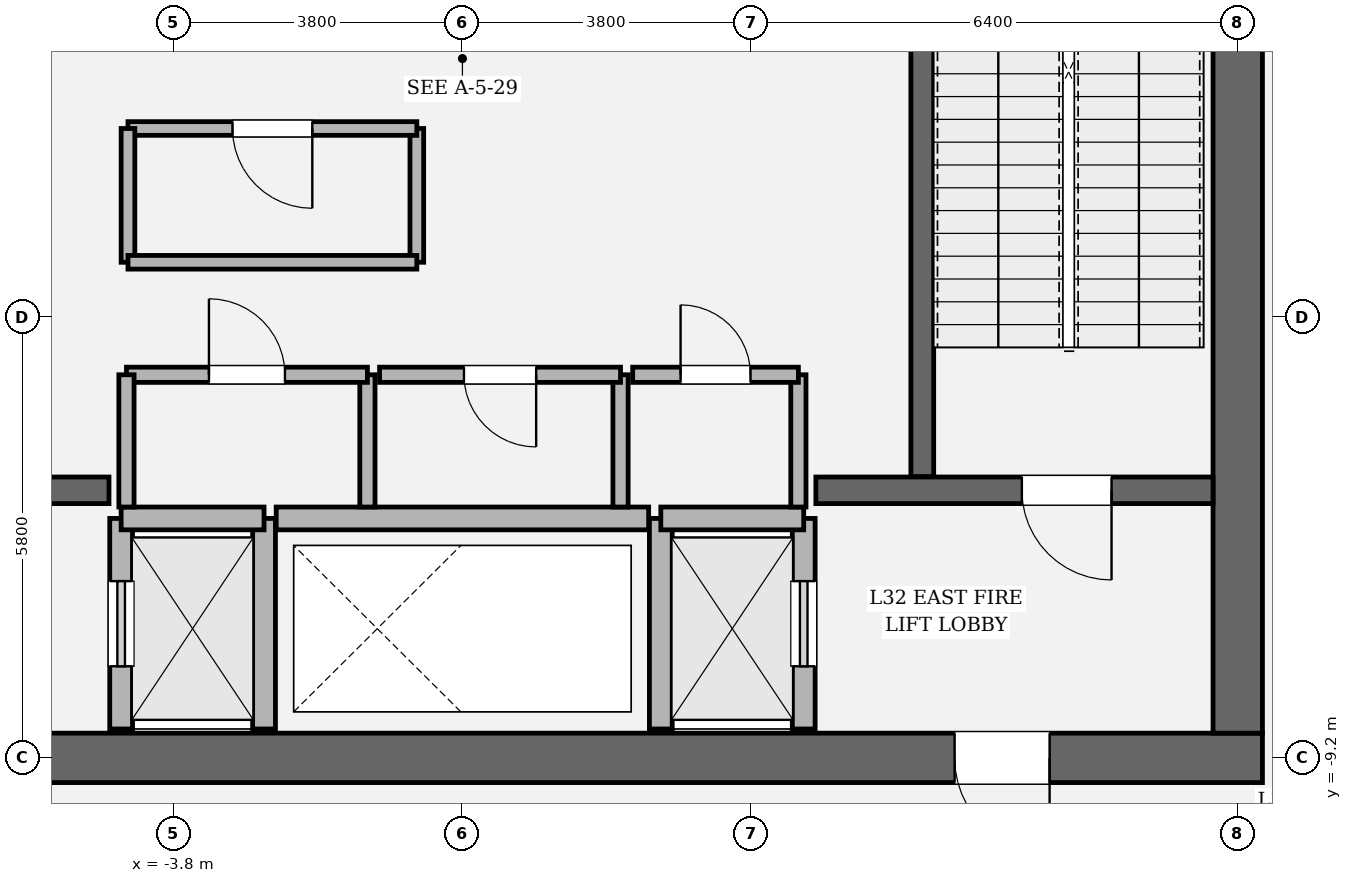
"""IFC4 building model, lengths in metres.
Left out: names, types, materials, properties, quantities, classifications, styles, units other than length and angle.
Written with IfcOpenShell. Run it as: python <this file> out.ifc"""

import sys

from ifc_helpers import new_model, si_unit, direction, frame, frame_2d, origin, place, context, subcontext, project, spatial, rectangle, extrude, element, fill, save


model = new_model("IFC4")
c1 = context("Model", 3, precision=1e-05, world=origin(), true_north=direction((0.0, 1.0)))
c2 = subcontext(c1, "Body", "Model", "MODEL_VIEW")
j1 = project(units=[si_unit("LENGTHUNIT", "METRE"), si_unit("PLANEANGLEUNIT", "RADIAN")], contexts=[c1])
p1 = place(None, origin())
s1 = spatial("IfcSite", under=j1, at=p1, CompositionType="ELEMENT")
p2 = place(p1, origin())
s2 = spatial("IfcBuilding", under=s1, at=p2, CompositionType="ELEMENT")
p3 = place(p2, frame((0.0, 0.0, 139.8)))
s3 = spatial("IfcBuildingStorey", under=s2, at=p3, CompositionType="ELEMENT", Elevation=139.8)
p4 = place(p3, frame((10.525, -9.2, 0.0), z_axis=(0.0, 0.0, 1.0), x_axis=(-1.0, 0.0, 0.0)))
e1 = element("IfcWall", 1, at=p4, inside=s3, PredefinedType="SHEAR", context=c2, shape_type="SweptSolid", body=[
    extrude(rectangle(XDim=21.05, YDim=0.65, at=frame_2d((10.525, 0.0))), origin(), (0.0, 0.0, 1.0), 4.05),
])
p5 = place(p4, frame((2.8, 0.0, 0.0)))
e2 = element("IfcOpeningElement", 2, at=p5, cuts=e1, PredefinedType="OPENING", context=c2, shape_type="SweptSolid", body=[
    extrude(rectangle(XDim=1.25, YDim=2.25, at=frame_2d((0.625, 1.125))), frame((0.0, 0.335, 0.0), z_axis=(0.0, -1.0, 0.0), x_axis=(1.0, 0.0, 0.0)), (0.0, 0.0, 1.0), 0.67),
])
p6 = place(p4, frame((17.0, 0.0, 0.0)))
e3 = element("IfcOpeningElement", 3, at=p6, cuts=e1, PredefinedType="OPENING", context=c2, shape_type="SweptSolid", body=[
    extrude(rectangle(XDim=1.25, YDim=2.25, at=frame_2d((0.625, 1.125))), frame((0.0, 0.335, 0.0), z_axis=(0.0, -1.0, 0.0), x_axis=(1.0, 0.0, 0.0)), (0.0, 0.0, 1.0), 0.67),
])
p7 = place(p3, frame((10.2, 8.875, 0.0), z_axis=(0.0, 0.0, 1.0), x_axis=(0.0, -1.0, 0.0)))
e4 = element("IfcWall", 4, at=p7, inside=s3, PredefinedType="SHEAR", context=c2, shape_type="SweptSolid", body=[
    extrude(rectangle(XDim=17.75, YDim=0.65, at=frame_2d((8.875, 0.0))), origin(), (0.0, 0.0, 1.0), 4.05),
])
p8 = place(p7, frame((3.905, 0.0, 0.0)))
e5 = element("IfcOpeningElement", 5, at=p8, cuts=e4, PredefinedType="OPENING", context=c2, shape_type="SweptSolid", body=[
    extrude(rectangle(XDim=1.18, YDim=2.2, at=frame_2d((0.59, 1.1))), frame((0.0, 0.335, 0.0), z_axis=(0.0, -1.0, 0.0), x_axis=(1.0, 0.0, 0.0)), (0.0, 0.0, 1.0), 0.67),
])
p9 = place(p3, frame((6.05, 3.45, 0.0), z_axis=(0.0, 0.0, 1.0), x_axis=(0.0, -1.0, 0.0)))
e6 = element("IfcWall", 6, at=p9, inside=s3, PredefinedType="SOLIDWALL", context=c2, shape_type="SweptSolid", body=[
    extrude(rectangle(XDim=8.95, YDim=0.3, at=frame_2d((4.475, 0.0))), origin(), (0.0, 0.0, 1.0), 4.05),
])
p10 = place(p3, frame((-9.875, -5.68, 0.0), z_axis=(0.0, 0.0, 1.0), x_axis=(1.0, 0.0, 0.0)))
e7 = element("IfcWall", 7, at=p10, inside=s3, PredefinedType="SOLIDWALL", context=c2, shape_type="SweptSolid", body=[
    extrude(rectangle(XDim=5.225, YDim=0.35, at=frame_2d((2.613, 0.0))), origin(), (0.0, 0.0, 1.0), 4.05),
])
p11 = place(p10, frame((1.335, 0.0, 0.0)))
e8 = element("IfcOpeningElement", 8, at=p11, cuts=e7, PredefinedType="OPENING", context=c2, shape_type="SweptSolid", body=[
    extrude(rectangle(XDim=1.18, YDim=2.2, at=frame_2d((0.59, 1.1))), frame((0.0, 0.185, 0.0), z_axis=(0.0, -1.0, 0.0), x_axis=(1.0, 0.0, 0.0)), (0.0, 0.0, 1.0), 0.37),
])
p12 = place(p3, frame((4.65, -5.68, 0.0), z_axis=(0.0, 0.0, 1.0), x_axis=(1.0, 0.0, 0.0)))
e9 = element("IfcWall", 9, at=p12, inside=s3, PredefinedType="SOLIDWALL", context=c2, shape_type="SweptSolid", body=[
    extrude(rectangle(XDim=5.225, YDim=0.35, at=frame_2d((2.613, 0.0))), origin(), (0.0, 0.0, 1.0), 4.05),
])
p13 = place(p12, frame((2.71, 0.0, 0.0)))
e10 = element("IfcOpeningElement", 10, at=p13, cuts=e9, PredefinedType="OPENING", context=c2, shape_type="SweptSolid", body=[
    extrude(rectangle(XDim=1.18, YDim=2.2, at=frame_2d((0.59, 1.1))), frame((0.0, 0.185, 0.0), z_axis=(0.0, -1.0, 0.0), x_axis=(1.0, 0.0, 0.0)), (0.0, 0.0, 1.0), 0.37),
])
p14 = place(p3, frame((-4.49, -8.82, 0.0), z_axis=(0.0, 0.0, 1.0), x_axis=(0.0, 1.0, 0.0)))
e11 = element("IfcWall", 11, at=p14, inside=s3, PredefinedType="SOLIDWALL", context=c2, shape_type="SweptSolid", body=[
    extrude(rectangle(XDim=2.77, YDim=0.3, at=frame_2d((1.385, 0.0))), origin(), (0.0, 0.0, 1.0), 3.83),
])
p15 = place(p14, frame((0.825, 0.0, 0.0)))
e12 = element("IfcOpeningElement", 12, at=p15, cuts=e11, PredefinedType="OPENING", context=c2, shape_type="SweptSolid", body=[
    extrude(rectangle(XDim=1.12, YDim=2.25, at=frame_2d((0.56, 1.125))), frame((0.0, 0.16, 0.0), z_axis=(0.0, -1.0, 0.0), x_axis=(1.0, 0.0, 0.0)), (0.0, 0.0, 1.0), 0.32),
])
p16 = place(p3, frame((-2.61, -8.82, 0.0), z_axis=(0.0, 0.0, 1.0), x_axis=(0.0, 1.0, 0.0)))
e13 = element("IfcWall", 13, at=p16, inside=s3, PredefinedType="SOLIDWALL", context=c2, shape_type="SweptSolid", body=[
    extrude(rectangle(XDim=2.77, YDim=0.3, at=frame_2d((1.385, 0.0))), origin(), (0.0, 0.0, 1.0), 3.83),
])
p17 = place(p3, frame((-4.49, -6.05, 0.0), z_axis=(0.0, 0.0, 1.0), x_axis=(1.0, 0.0, 0.0)))
e14 = element("IfcWall", 14, at=p17, inside=s3, PredefinedType="SOLIDWALL", context=c2, shape_type="SweptSolid", body=[
    extrude(rectangle(XDim=1.88, YDim=0.3, at=frame_2d((0.94, 0.0))), origin(), (0.0, 0.0, 1.0), 3.83),
])
p18 = place(p3, frame((4.49, -8.82, 0.0), z_axis=(0.0, 0.0, 1.0), x_axis=(0.0, 1.0, 0.0)))
e15 = element("IfcWall", 15, at=p18, inside=s3, PredefinedType="SOLIDWALL", context=c2, shape_type="SweptSolid", body=[
    extrude(rectangle(XDim=2.77, YDim=0.3, at=frame_2d((1.385, 0.0))), origin(), (0.0, 0.0, 1.0), 3.83),
])
p19 = place(p18, frame((0.825, 0.0, 0.0)))
e16 = element("IfcOpeningElement", 16, at=p19, cuts=e15, PredefinedType="OPENING", context=c2, shape_type="SweptSolid", body=[
    extrude(rectangle(XDim=1.12, YDim=2.25, at=frame_2d((0.56, 1.125))), frame((0.0, 0.16, 0.0), z_axis=(0.0, -1.0, 0.0), x_axis=(1.0, 0.0, 0.0)), (0.0, 0.0, 1.0), 0.32),
])
p20 = place(p3, frame((2.61, -8.82, 0.0), z_axis=(0.0, 0.0, 1.0), x_axis=(0.0, 1.0, 0.0)))
e17 = element("IfcWall", 17, at=p20, inside=s3, PredefinedType="SOLIDWALL", context=c2, shape_type="SweptSolid", body=[
    extrude(rectangle(XDim=2.77, YDim=0.3, at=frame_2d((1.385, 0.0))), origin(), (0.0, 0.0, 1.0), 3.83),
])
p21 = place(p3, frame((2.61, -6.05, 0.0), z_axis=(0.0, 0.0, 1.0), x_axis=(1.0, 0.0, 0.0)))
e18 = element("IfcWall", 18, at=p21, inside=s3, PredefinedType="SOLIDWALL", context=c2, shape_type="SweptSolid", body=[
    extrude(rectangle(XDim=1.88, YDim=0.3, at=frame_2d((0.94, 0.0))), origin(), (0.0, 0.0, 1.0), 3.83),
])
p22 = place(p3, frame((-2.45, -6.05, 0.0), z_axis=(0.0, 0.0, 1.0), x_axis=(1.0, 0.0, 0.0)))
e19 = element("IfcWall", 19, at=p22, inside=s3, PredefinedType="SOLIDWALL", context=c2, shape_type="SweptSolid", body=[
    extrude(rectangle(XDim=4.9, YDim=0.3, at=frame_2d((2.45, 0.0))), origin(), (0.0, 0.0, 1.0), 3.83),
])
p23 = place(p3, frame((-1.25, -5.9, 0.0), z_axis=(0.0, 0.0, 1.0), x_axis=(0.0, 1.0, 0.0)))
e20 = element("IfcWall", 20, at=p23, inside=s3, PredefinedType="SOLIDWALL", context=c2, shape_type="SweptSolid", body=[
    extrude(rectangle(XDim=1.74, YDim=0.2, at=frame_2d((0.87, 0.0))), origin(), (0.0, 0.0, 1.0), 3.83),
])
p24 = place(p3, frame((-1.25, -4.16, 0.0), z_axis=(0.0, 0.0, 1.0), x_axis=(-1.0, 0.0, 0.0)))
e21 = element("IfcWall", 21, at=p24, inside=s3, PredefinedType="SOLIDWALL", context=c2, shape_type="SweptSolid", body=[
    extrude(rectangle(XDim=3.17, YDim=0.2, at=frame_2d((1.585, 0.0))), origin(), (0.0, 0.0, 1.0), 3.83),
])
p25 = place(p24, frame((1.085, 0.0, 0.0)))
e22 = element("IfcOpeningElement", 22, at=p25, cuts=e21, PredefinedType="OPENING", context=c2, shape_type="SweptSolid", body=[
    extrude(rectangle(XDim=1.0, YDim=2.15, at=frame_2d((0.5, 1.075))), frame((0.0, 0.11, 0.0), z_axis=(0.0, -1.0, 0.0), x_axis=(1.0, 0.0, 0.0)), (0.0, 0.0, 1.0), 0.22),
])
for number, where, z_axis, x_axis in (
    (23, (-4.42, -4.16, 0.0), (0.0, 0.0, 1.0), (0.0, -1.0, 0.0)),
    (24, (2.08, -5.9, 0.0), (0.0, 0.0, 1.0), (0.0, 1.0, 0.0)),
):
    element("IfcWall", number, at=place(p3, frame(where, z_axis=z_axis, x_axis=x_axis)), inside=s3, PredefinedType="SOLIDWALL", context=c2, shape_type="SweptSolid", body=[
        extrude(rectangle(XDim=1.74, YDim=0.2, at=frame_2d((0.87, 0.0))), origin(), (0.0, 0.0, 1.0), 3.83),
    ])
p26 = place(p3, frame((2.08, -4.16, 0.0), z_axis=(0.0, 0.0, 1.0), x_axis=(-1.0, 0.0, 0.0)))
e25 = element("IfcWall", 25, at=p26, inside=s3, PredefinedType="SOLIDWALL", context=c2, shape_type="SweptSolid", body=[
    extrude(rectangle(XDim=3.17, YDim=0.2, at=frame_2d((1.585, 0.0))), origin(), (0.0, 0.0, 1.0), 3.83),
])
p27 = place(p26, frame((1.11, 0.0, 0.0)))
e26 = element("IfcOpeningElement", 26, at=p27, cuts=e25, PredefinedType="OPENING", context=c2, shape_type="SweptSolid", body=[
    extrude(rectangle(XDim=0.95, YDim=2.15, at=frame_2d((0.475, 1.075))), frame((0.0, 0.11, 0.0), z_axis=(0.0, -1.0, 0.0), x_axis=(1.0, 0.0, 0.0)), (0.0, 0.0, 1.0), 0.22),
])
p28 = place(p3, frame((4.42, -5.9, 0.0), z_axis=(0.0, 0.0, 1.0), x_axis=(0.0, 1.0, 0.0)))
e27 = element("IfcWall", 27, at=p28, inside=s3, PredefinedType="SOLIDWALL", context=c2, shape_type="SweptSolid", body=[
    extrude(rectangle(XDim=1.74, YDim=0.2, at=frame_2d((0.87, 0.0))), origin(), (0.0, 0.0, 1.0), 3.83),
])
p29 = place(p3, frame((4.42, -4.16, 0.0), z_axis=(0.0, 0.0, 1.0), x_axis=(-1.0, 0.0, 0.0)))
e28 = element("IfcWall", 28, at=p29, inside=s3, PredefinedType="SOLIDWALL", context=c2, shape_type="SweptSolid", body=[
    extrude(rectangle(XDim=2.18, YDim=0.2, at=frame_2d((1.09, 0.0))), origin(), (0.0, 0.0, 1.0), 3.83),
])
p30 = place(p29, frame((0.63, 0.0, 0.0)))
e29 = element("IfcOpeningElement", 29, at=p30, cuts=e28, PredefinedType="OPENING", context=c2, shape_type="SweptSolid", body=[
    extrude(rectangle(XDim=0.92, YDim=2.1, at=frame_2d((0.46, 1.05))), frame((0.0, 0.11, 0.0), z_axis=(0.0, -1.0, 0.0), x_axis=(1.0, 0.0, 0.0)), (0.0, 0.0, 1.0), 0.22),
])
p31 = place(p3, frame((-0.6, -2.68, 0.0), z_axis=(0.0, 0.0, 1.0), x_axis=(0.0, 1.0, 0.0)))
e30 = element("IfcWall", 30, at=p31, inside=s3, PredefinedType="PARTITIONING", context=c2, shape_type="SweptSolid", body=[
    extrude(rectangle(XDim=1.76, YDim=0.18, at=frame_2d((0.88, 0.0))), origin(), (0.0, 0.0, 1.0), 3.83),
])
p32 = place(p3, frame((-0.6, -0.92, 0.0), z_axis=(0.0, 0.0, 1.0), x_axis=(-1.0, 0.0, 0.0)))
e31 = element("IfcWall", 31, at=p32, inside=s3, PredefinedType="PARTITIONING", context=c2, shape_type="SweptSolid", body=[
    extrude(rectangle(XDim=3.8, YDim=0.18, at=frame_2d((1.9, 0.0))), origin(), (0.0, 0.0, 1.0), 3.83),
])
p33 = place(p32, frame((1.375, 0.0, 0.0)))
e32 = element("IfcOpeningElement", 32, at=p33, cuts=e31, PredefinedType="OPENING", context=c2, shape_type="SweptSolid", body=[
    extrude(rectangle(XDim=1.05, YDim=2.2, at=frame_2d((0.525, 1.1))), frame((0.0, 0.1, 0.0), z_axis=(0.0, -1.0, 0.0), x_axis=(1.0, 0.0, 0.0)), (0.0, 0.0, 1.0), 0.2),
])
p34 = place(p3, frame((-4.4, -0.92, 0.0), z_axis=(0.0, 0.0, 1.0), x_axis=(0.0, -1.0, 0.0)))
e33 = element("IfcWall", 33, at=p34, inside=s3, PredefinedType="PARTITIONING", context=c2, shape_type="SweptSolid", body=[
    extrude(rectangle(XDim=1.76, YDim=0.18, at=frame_2d((0.88, 0.0))), origin(), (0.0, 0.0, 1.0), 3.83),
])
p35 = place(p3, frame((-4.4, -2.68, 0.0), z_axis=(0.0, 0.0, 1.0), x_axis=(1.0, 0.0, 0.0)))
e34 = element("IfcWall", 34, at=p35, inside=s3, PredefinedType="PARTITIONING", context=c2, shape_type="SweptSolid", body=[
    extrude(rectangle(XDim=3.8, YDim=0.18, at=frame_2d((1.9, 0.0))), origin(), (0.0, 0.0, 1.0), 3.83),
])
p36 = place(p13, origin())
e35 = element("IfcDoor", 35, at=p36, inside=s3, OperationType="SINGLE_SWING_RIGHT", PredefinedType="DOOR", context=c2, shape_type="SweptSolid", body=[
    extrude(rectangle(XDim=1.18, YDim=2.2, at=frame_2d((0.59, 1.1))), frame((0.0, 0.025, 0.0), z_axis=(0.0, -1.0, 0.0), x_axis=(1.0, 0.0, 0.0)), (0.0, 0.0, 1.0), 0.05),
])
fill(e10, e35)
p37 = place(p5, origin())
e36 = element("IfcDoor", 36, at=p37, inside=s3, OperationType="SINGLE_SWING_LEFT", PredefinedType="DOOR", context=c2, shape_type="SweptSolid", body=[
    extrude(rectangle(XDim=1.25, YDim=2.25, at=frame_2d((0.625, 1.125))), frame((0.0, 0.025, 0.0), z_axis=(0.0, -1.0, 0.0), x_axis=(1.0, 0.0, 0.0)), (0.0, 0.0, 1.0), 0.05),
])
fill(e2, e36)
p38 = place(p15, origin())
e37 = element("IfcDoor", 37, at=p38, inside=s3, OperationType="SLIDING_TO_LEFT", PredefinedType="DOOR", context=c2, shape_type="SweptSolid", body=[
    extrude(rectangle(XDim=1.12, YDim=2.25, at=frame_2d((0.56, 1.125))), frame((0.0, 0.025, 0.0), z_axis=(0.0, -1.0, 0.0), x_axis=(1.0, 0.0, 0.0)), (0.0, 0.0, 1.0), 0.05),
])
fill(e12, e37)
p39 = place(p19, origin())
e38 = element("IfcDoor", 38, at=p39, inside=s3, OperationType="SLIDING_TO_RIGHT", PredefinedType="DOOR", context=c2, shape_type="SweptSolid", body=[
    extrude(rectangle(XDim=1.12, YDim=2.25, at=frame_2d((0.56, 1.125))), frame((0.0, 0.025, 0.0), z_axis=(0.0, -1.0, 0.0), x_axis=(1.0, 0.0, 0.0)), (0.0, 0.0, 1.0), 0.05),
])
fill(e16, e38)
p40 = place(p25, origin())
e39 = element("IfcDoor", 39, at=p40, inside=s3, OperationType="SINGLE_SWING_RIGHT", PredefinedType="DOOR", context=c2, shape_type="SweptSolid", body=[
    extrude(rectangle(XDim=1.0, YDim=2.15, at=frame_2d((0.5, 1.075))), frame((0.0, 0.025, 0.0), z_axis=(0.0, -1.0, 0.0), x_axis=(1.0, 0.0, 0.0)), (0.0, 0.0, 1.0), 0.05),
])
fill(e22, e39)
p41 = place(p27, origin())
e40 = element("IfcDoor", 40, at=p41, inside=s3, OperationType="SINGLE_SWING_LEFT", PredefinedType="DOOR", context=c2, shape_type="SweptSolid", body=[
    extrude(rectangle(XDim=0.95, YDim=2.15, at=frame_2d((0.475, 1.075))), frame((0.0, 0.025, 0.0), z_axis=(0.0, -1.0, 0.0), x_axis=(1.0, 0.0, 0.0)), (0.0, 0.0, 1.0), 0.05),
])
fill(e26, e40)
p42 = place(p30, origin())
e41 = element("IfcDoor", 41, at=p42, inside=s3, OperationType="SINGLE_SWING_RIGHT", PredefinedType="DOOR", context=c2, shape_type="SweptSolid", body=[
    extrude(rectangle(XDim=0.92, YDim=2.1, at=frame_2d((0.46, 1.05))), frame((0.0, 0.025, 0.0), z_axis=(0.0, -1.0, 0.0), x_axis=(1.0, 0.0, 0.0)), (0.0, 0.0, 1.0), 0.05),
])
fill(e29, e41)
p43 = place(p33, origin())
e42 = element("IfcDoor", 42, at=p43, inside=s3, OperationType="SINGLE_SWING_LEFT", PredefinedType="DOOR", context=c2, shape_type="SweptSolid", body=[
    extrude(rectangle(XDim=1.05, YDim=2.2, at=frame_2d((0.525, 1.1))), frame((0.0, 0.025, 0.0), z_axis=(0.0, -1.0, 0.0), x_axis=(1.0, 0.0, 0.0)), (0.0, 0.0, 1.0), 0.05),
])
fill(e32, e42)
save(model, sys.argv[1])
